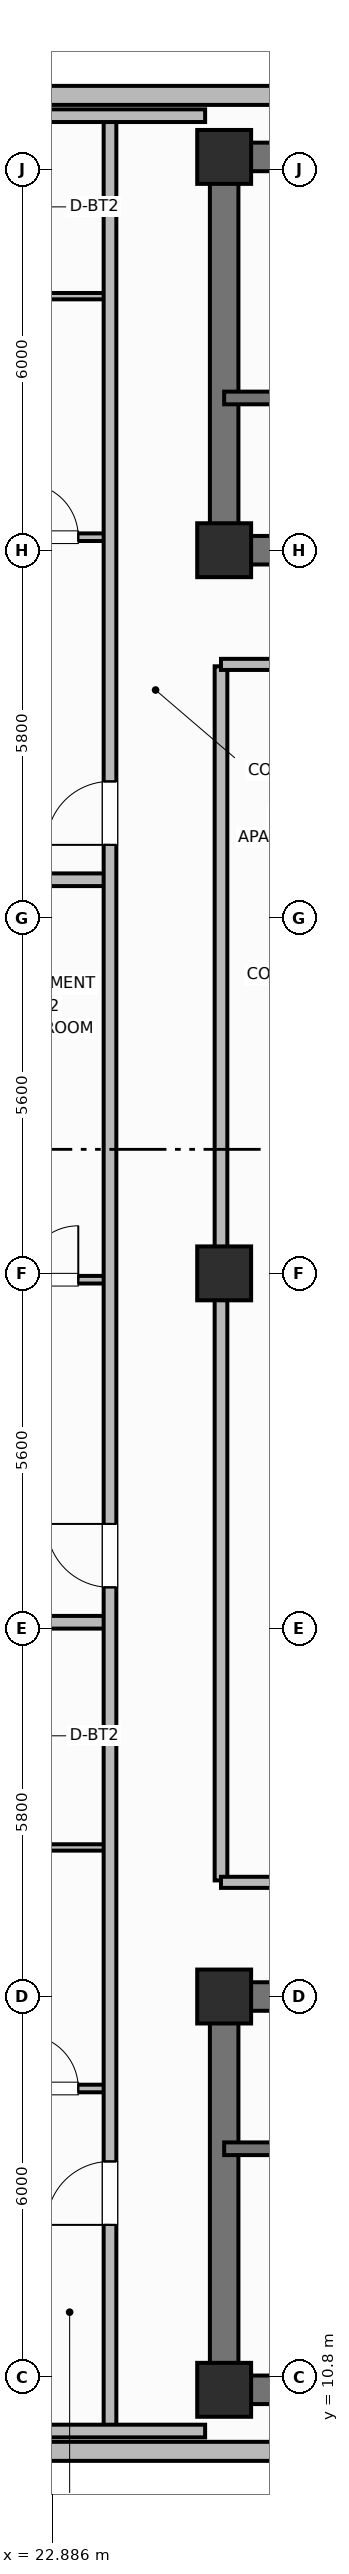
"""IFC4 building model, lengths in metres.
Left out: names, types, materials, properties, quantities, classifications, styles, units other than length and angle.
Written with IfcOpenShell. Run it as: python <this file> out.ifc"""

import sys

from ifc_helpers import new_model, si_unit, direction, frame, frame_2d, origin, origin_2d, place, context, subcontext, project, spatial, rectangle, extrude, element, fill, save


model = new_model("IFC4")
c1 = context("Model", 3, precision=1e-05, world=origin(), true_north=direction((0.0, 1.0)))
c2 = subcontext(c1, "Body", "Model", "MODEL_VIEW")
j1 = project(units=[si_unit("LENGTHUNIT", "METRE"), si_unit("PLANEANGLEUNIT", "RADIAN")], contexts=[c1])
p1 = place(None, origin())
s1 = spatial("IfcSite", under=j1, at=p1, CompositionType="ELEMENT")
p2 = place(p1, origin())
s2 = spatial("IfcBuilding", under=s1, at=p2, CompositionType="ELEMENT")
p3 = place(p2, frame((0.0, 0.0, 236.9)))
s3 = spatial("IfcBuildingStorey", under=s2, at=p3, CompositionType="ELEMENT", Elevation=236.9)
p4 = place(p3, frame((52.8, 10.6, 0.0), z_axis=(0.0, 0.0, 1.0), x_axis=(-1.0, 0.0, 0.0)))
e1 = element("IfcWall", 1, at=p4, inside=s3, PredefinedType="SHEAR", context=c2, shape_type="SweptSolid", body=[
    extrude(rectangle(XDim=27.2, YDim=0.45, at=frame_2d((13.6, 0.0))), origin(), (0.0, 0.0, 1.0), 3.7),
])
p5 = place(p3, frame((25.6, 10.825, 0.0), z_axis=(0.0, 0.0, 1.0), x_axis=(0.0, 1.0, 0.0)))
e2 = element("IfcWall", 2, at=p5, inside=s3, PredefinedType="SHEAR", context=c2, shape_type="SweptSolid", body=[
    extrude(rectangle(XDim=5.75, YDim=0.45, at=frame_2d((2.875, 0.0))), origin(), (0.0, 0.0, 1.0), 3.7),
])
p6 = place(p3, frame((25.6, 16.8, 0.0), z_axis=(0.0, 0.0, 1.0), x_axis=(1.0, 0.0, 0.0)))
e3 = element("IfcWall", 3, at=p6, inside=s3, PredefinedType="SHEAR", context=c2, shape_type="SweptSolid", body=[
    extrude(rectangle(XDim=27.2, YDim=0.45, at=frame_2d((13.6, 0.0))), origin(), (0.0, 0.0, 1.0), 3.7),
])
p7 = place(p6, frame((1.7, 0.0, 0.0)))
e4 = element("IfcOpeningElement", 4, at=p7, cuts=e3, PredefinedType="OPENING", context=c2, shape_type="SweptSolid", body=[
    extrude(rectangle(XDim=1.1, YDim=2.15, at=frame_2d((0.55, 1.075))), frame((0.0, 0.235, 0.0), z_axis=(0.0, -1.0, 0.0), x_axis=(1.0, 0.0, 0.0)), (0.0, 0.0, 1.0), 0.47),
])
p8 = place(p6, frame((4.45, 0.0, 0.0)))
e5 = element("IfcOpeningElement", 5, at=p8, cuts=e3, PredefinedType="OPENING", context=c2, shape_type="SweptSolid", body=[
    extrude(rectangle(XDim=0.85, YDim=2.1, at=frame_2d((0.425, 1.05))), frame((0.0, 0.235, 0.0), z_axis=(0.0, -1.0, 0.0), x_axis=(1.0, 0.0, 0.0)), (0.0, 0.0, 1.0), 0.47),
])
p9 = place(p6, frame((6.5, 0.0, 0.0)))
e6 = element("IfcOpeningElement", 6, at=p9, cuts=e3, PredefinedType="OPENING", context=c2, shape_type="SweptSolid", body=[
    extrude(rectangle(XDim=0.85, YDim=2.1, at=frame_2d((0.425, 1.05))), frame((0.0, 0.235, 0.0), z_axis=(0.0, -1.0, 0.0), x_axis=(1.0, 0.0, 0.0)), (0.0, 0.0, 1.0), 0.47),
])
p10 = place(p6, frame((13.0, 0.0, 0.0)))
e7 = element("IfcOpeningElement", 7, at=p10, cuts=e3, PredefinedType="OPENING", context=c2, shape_type="SweptSolid", body=[
    extrude(rectangle(XDim=1.2, YDim=2.15, at=frame_2d((0.6, 1.075))), frame((0.0, 0.235, 0.0), z_axis=(0.0, -1.0, 0.0), x_axis=(1.0, 0.0, 0.0)), (0.0, 0.0, 1.0), 0.47),
])
p11 = place(p6, frame((19.8, 0.0, 0.0)))
e8 = element("IfcOpeningElement", 8, at=p11, cuts=e3, PredefinedType="OPENING", context=c2, shape_type="SweptSolid", body=[
    extrude(rectangle(XDim=0.85, YDim=2.1, at=frame_2d((0.425, 1.05))), frame((0.0, 0.235, 0.0), z_axis=(0.0, -1.0, 0.0), x_axis=(1.0, 0.0, 0.0)), (0.0, 0.0, 1.0), 0.47),
])
p12 = place(p6, frame((24.2, 0.0, 0.0)))
e9 = element("IfcOpeningElement", 9, at=p12, cuts=e3, PredefinedType="OPENING", context=c2, shape_type="SweptSolid", body=[
    extrude(rectangle(XDim=0.85, YDim=2.1, at=frame_2d((0.425, 1.05))), frame((0.0, 0.235, 0.0), z_axis=(0.0, -1.0, 0.0), x_axis=(1.0, 0.0, 0.0)), (0.0, 0.0, 1.0), 0.47),
])
p13 = place(p3, frame((25.6, 45.8, 0.0), z_axis=(0.0, 0.0, 1.0), x_axis=(1.0, 0.0, 0.0)))
e10 = element("IfcWall", 10, at=p13, inside=s3, PredefinedType="SHEAR", context=c2, shape_type="SweptSolid", body=[
    extrude(rectangle(XDim=27.2, YDim=0.45, at=frame_2d((13.6, 0.0))), origin(), (0.0, 0.0, 1.0), 3.7),
])
p14 = place(p3, frame((25.6, 39.825, 0.0), z_axis=(0.0, 0.0, 1.0), x_axis=(0.0, 1.0, 0.0)))
e11 = element("IfcWall", 11, at=p14, inside=s3, PredefinedType="SHEAR", context=c2, shape_type="SweptSolid", body=[
    extrude(rectangle(XDim=5.75, YDim=0.45, at=frame_2d((2.875, 0.0))), origin(), (0.0, 0.0, 1.0), 3.7),
])
p15 = place(p3, frame((52.8, 39.6, 0.0), z_axis=(0.0, 0.0, 1.0), x_axis=(-1.0, 0.0, 0.0)))
e12 = element("IfcWall", 12, at=p15, inside=s3, PredefinedType="SHEAR", context=c2, shape_type="SweptSolid", body=[
    extrude(rectangle(XDim=27.2, YDim=0.45, at=frame_2d((13.6, 0.0))), origin(), (0.0, 0.0, 1.0), 3.7),
])
p16 = place(p15, frame((24.3, 0.0, 0.0)))
e13 = element("IfcOpeningElement", 13, at=p16, cuts=e12, PredefinedType="OPENING", context=c2, shape_type="SweptSolid", body=[
    extrude(rectangle(XDim=1.1, YDim=2.15, at=frame_2d((0.55, 1.075))), frame((0.0, 0.235, 0.0), z_axis=(0.0, -1.0, 0.0), x_axis=(1.0, 0.0, 0.0)), (0.0, 0.0, 1.0), 0.47),
])
p17 = place(p15, frame((21.85, 0.0, 0.0)))
e14 = element("IfcOpeningElement", 14, at=p17, cuts=e12, PredefinedType="OPENING", context=c2, shape_type="SweptSolid", body=[
    extrude(rectangle(XDim=0.85, YDim=2.1, at=frame_2d((0.425, 1.05))), frame((0.0, 0.235, 0.0), z_axis=(0.0, -1.0, 0.0), x_axis=(1.0, 0.0, 0.0)), (0.0, 0.0, 1.0), 0.47),
])
p18 = place(p15, frame((19.85, 0.0, 0.0)))
e15 = element("IfcOpeningElement", 15, at=p18, cuts=e12, PredefinedType="OPENING", context=c2, shape_type="SweptSolid", body=[
    extrude(rectangle(XDim=0.85, YDim=2.1, at=frame_2d((0.425, 1.05))), frame((0.0, 0.235, 0.0), z_axis=(0.0, -1.0, 0.0), x_axis=(1.0, 0.0, 0.0)), (0.0, 0.0, 1.0), 0.47),
])
p19 = place(p15, frame((15.1, 0.0, 0.0)))
e16 = element("IfcOpeningElement", 16, at=p19, cuts=e12, PredefinedType="OPENING", context=c2, shape_type="SweptSolid", body=[
    extrude(rectangle(XDim=1.2, YDim=2.15, at=frame_2d((0.6, 1.075))), frame((0.0, 0.235, 0.0), z_axis=(0.0, -1.0, 0.0), x_axis=(1.0, 0.0, 0.0)), (0.0, 0.0, 1.0), 0.47),
])
p20 = place(p15, frame((12.6, 0.0, 0.0)))
e17 = element("IfcOpeningElement", 17, at=p20, cuts=e12, PredefinedType="OPENING", context=c2, shape_type="SweptSolid", body=[
    extrude(rectangle(XDim=0.85, YDim=2.1, at=frame_2d((0.425, 1.05))), frame((0.0, 0.235, 0.0), z_axis=(0.0, -1.0, 0.0), x_axis=(1.0, 0.0, 0.0)), (0.0, 0.0, 1.0), 0.47),
])
p21 = place(p15, frame((10.85, 0.0, 0.0)))
e18 = element("IfcOpeningElement", 18, at=p21, cuts=e12, PredefinedType="OPENING", context=c2, shape_type="SweptSolid", body=[
    extrude(rectangle(XDim=0.85, YDim=2.1, at=frame_2d((0.425, 1.05))), frame((0.0, 0.235, 0.0), z_axis=(0.0, -1.0, 0.0), x_axis=(1.0, 0.0, 0.0)), (0.0, 0.0, 1.0), 0.47),
])
p22 = place(p15, frame((7.35, 0.0, 0.0)))
e19 = element("IfcOpeningElement", 19, at=p22, cuts=e12, PredefinedType="OPENING", context=c2, shape_type="SweptSolid", body=[
    extrude(rectangle(XDim=0.85, YDim=2.1, at=frame_2d((0.425, 1.05))), frame((0.0, 0.235, 0.0), z_axis=(0.0, -1.0, 0.0), x_axis=(1.0, 0.0, 0.0)), (0.0, 0.0, 1.0), 0.47),
])
p23 = place(p15, frame((4.2, 0.0, 0.0)))
e20 = element("IfcOpeningElement", 20, at=p23, cuts=e12, PredefinedType="OPENING", context=c2, shape_type="SweptSolid", body=[
    extrude(rectangle(XDim=1.3, YDim=2.2, at=frame_2d((0.65, 1.1))), frame((0.0, 0.235, 0.0), z_axis=(0.0, -1.0, 0.0), x_axis=(1.0, 0.0, 0.0)), (0.0, 0.0, 1.0), 0.47),
])
for number, where, z_axis, x_axis in (
    (21, (25.6, 10.6, 0.0), (0.0, 0.0, 1.0), (1.0, 0.0, 0.0)),
    (22, (25.6, 16.8, 0.0), (0.0, 0.0, 1.0), (1.0, 0.0, 0.0)),
    (23, (25.6, 39.6, 0.0), (0.0, 0.0, 1.0), (1.0, 0.0, 0.0)),
    (24, (25.6, 45.8, 0.0), (0.0, 0.0, 1.0), (1.0, 0.0, 0.0)),
    (25, (25.6, 28.2, 0.0), (0.0, 0.0, 1.0), (1.0, 0.0, 0.0)),
):
    element("IfcColumn", number, at=place(p3, frame(where, z_axis=z_axis, x_axis=x_axis)), inside=s3, PredefinedType="COLUMN", context=c2, shape_type="SweptSolid", body=[
        extrude(rectangle(XDim=0.85, YDim=0.85, at=origin_2d()), origin(), (0.0, 0.0, 1.0), 3.7),
    ])
p24 = place(p3, frame((22.56, 9.63, 0.0), z_axis=(0.0, 0.0, 1.0), x_axis=(1.0, 0.0, 0.0)))
e26 = element("IfcWall", 26, at=p24, inside=s3, PredefinedType="SOLIDWALL", context=c2, shape_type="SweptSolid", body=[
    extrude(rectangle(XDim=4.45, YDim=0.3, at=frame_2d((2.225, 0.0))), origin(), (0.0, 0.0, 1.0), 2.73),
])
p25 = place(p3, frame((47.79, 46.77, 0.0), z_axis=(0.0, 0.0, 1.0), x_axis=(-1.0, 0.0, 0.0)))
e27 = element("IfcWall", 27, at=p25, inside=s3, PredefinedType="SOLIDWALL", context=c2, shape_type="SweptSolid", body=[
    extrude(rectangle(XDim=25.23, YDim=0.3, at=frame_2d((12.615, 0.0))), origin(), (0.0, 0.0, 1.0), 2.73),
])
p26 = place(p25, frame((1.659, 0.0, 0.76)))
e28 = element("IfcOpeningElement", 28, at=p26, cuts=e27, PredefinedType="OPENING", context=c2, shape_type="SweptSolid", body=[
    extrude(rectangle(XDim=1.4, YDim=1.85, at=frame_2d((0.7, 0.925))), frame((0.0, 0.16, 0.0), z_axis=(0.0, -1.0, 0.0), x_axis=(1.0, 0.0, 0.0)), (0.0, 0.0, 1.0), 0.32),
])
p27 = place(p25, frame((5.778, 0.0, 0.76)))
e29 = element("IfcOpeningElement", 29, at=p27, cuts=e27, PredefinedType="OPENING", context=c2, shape_type="SweptSolid", body=[
    extrude(rectangle(XDim=1.4, YDim=1.85, at=frame_2d((0.7, 0.925))), frame((0.0, 0.16, 0.0), z_axis=(0.0, -1.0, 0.0), x_axis=(1.0, 0.0, 0.0)), (0.0, 0.0, 1.0), 0.32),
])
p28 = place(p25, frame((8.496, 0.0, 0.76)))
e30 = element("IfcOpeningElement", 30, at=p28, cuts=e27, PredefinedType="OPENING", context=c2, shape_type="SweptSolid", body=[
    extrude(rectangle(XDim=1.4, YDim=1.85, at=frame_2d((0.7, 0.925))), frame((0.0, 0.16, 0.0), z_axis=(0.0, -1.0, 0.0), x_axis=(1.0, 0.0, 0.0)), (0.0, 0.0, 1.0), 0.32),
])
p29 = place(p25, frame((15.333, 0.0, 0.76)))
e31 = element("IfcOpeningElement", 31, at=p29, cuts=e27, PredefinedType="OPENING", context=c2, shape_type="SweptSolid", body=[
    extrude(rectangle(XDim=1.4, YDim=1.85, at=frame_2d((0.7, 0.925))), frame((0.0, 0.16, 0.0), z_axis=(0.0, -1.0, 0.0), x_axis=(1.0, 0.0, 0.0)), (0.0, 0.0, 1.0), 0.32),
])
p30 = place(p25, frame((18.752, 0.0, 0.76)))
e32 = element("IfcOpeningElement", 32, at=p30, cuts=e27, PredefinedType="OPENING", context=c2, shape_type="SweptSolid", body=[
    extrude(rectangle(XDim=1.4, YDim=1.85, at=frame_2d((0.7, 0.925))), frame((0.0, 0.16, 0.0), z_axis=(0.0, -1.0, 0.0), x_axis=(1.0, 0.0, 0.0)), (0.0, 0.0, 1.0), 0.32),
])
p31 = place(p3, frame((25.6, 14.4, 0.0), z_axis=(0.0, 0.0, 1.0), x_axis=(1.0, 0.0, 0.0)))
e33 = element("IfcWall", 33, at=p31, inside=s3, PredefinedType="SHEAR", context=c2, shape_type="SweptSolid", body=[
    extrude(rectangle(XDim=9.55, YDim=0.2, at=frame_2d((4.775, 0.0))), origin(), (0.0, 0.0, 1.0), 3.7),
])
p32 = place(p31, frame((1.05, 0.0, 0.0)))
e34 = element("IfcOpeningElement", 34, at=p32, cuts=e33, PredefinedType="OPENING", context=c2, shape_type="SweptSolid", body=[
    extrude(rectangle(XDim=1.1, YDim=2.15, at=frame_2d((0.55, 1.075))), frame((0.0, 0.11, 0.0), z_axis=(0.0, -1.0, 0.0), x_axis=(1.0, 0.0, 0.0)), (0.0, 0.0, 1.0), 0.22),
])
p33 = place(p3, frame((35.15, 42.0, 0.0), z_axis=(0.0, 0.0, 1.0), x_axis=(-1.0, 0.0, 0.0)))
e35 = element("IfcWall", 35, at=p33, inside=s3, PredefinedType="SHEAR", context=c2, shape_type="SweptSolid", body=[
    extrude(rectangle(XDim=9.55, YDim=0.2, at=frame_2d((4.775, 0.0))), origin(), (0.0, 0.0, 1.0), 3.7),
])
p34 = place(p33, frame((7.25, 0.0, 0.0)))
e36 = element("IfcOpeningElement", 36, at=p34, cuts=e35, PredefinedType="OPENING", context=c2, shape_type="SweptSolid", body=[
    extrude(rectangle(XDim=1.1, YDim=2.15, at=frame_2d((0.55, 1.075))), frame((0.0, 0.11, 0.0), z_axis=(0.0, -1.0, 0.0), x_axis=(1.0, 0.0, 0.0)), (0.0, 0.0, 1.0), 0.22),
])
p35 = place(p3, frame((25.55, 18.63, 0.0), z_axis=(0.0, 0.0, 1.0), x_axis=(0.0, 1.0, 0.0)))
e37 = element("IfcWall", 37, at=p35, inside=s3, PredefinedType="PARTITIONING", context=c2, shape_type="SweptSolid", body=[
    extrude(rectangle(XDim=19.14, YDim=0.2, at=frame_2d((9.57, 0.0))), origin(), (0.0, 0.0, 1.0), 2.56),
])
for number, where, z_axis, x_axis in (
    (38, (25.55, 18.6, 0.0), (0.0, 0.0, 1.0), (1.0, 0.0, 0.0)),
    (39, (25.55, 37.8, 0.0), (0.0, 0.0, 1.0), (1.0, 0.0, 0.0)),
):
    element("IfcWall", number, at=place(p3, frame(where, z_axis=z_axis, x_axis=x_axis)), inside=s3, PredefinedType="PARTITIONING", context=c2, shape_type="SweptSolid", body=[
        extrude(rectangle(XDim=3.5, YDim=0.175, at=frame_2d((1.75, 0.0))), origin(), (0.0, 0.0, 1.0), 2.56),
    ])
p36 = place(p3, frame((21.85, 15.35, 0.0), z_axis=(0.0, 0.0, 1.0), x_axis=(1.0, 0.0, 0.0)))
e40 = element("IfcWall", 40, at=p36, inside=s3, PredefinedType="PARTITIONING", context=c2, shape_type="SweptSolid", body=[
    extrude(rectangle(XDim=1.95, YDim=0.12, at=frame_2d((0.975, 0.0))), origin(), (0.0, 0.0, 1.0), 2.56),
])
p37 = place(p36, frame((0.6, 0.0, 0.0)))
e41 = element("IfcOpeningElement", 41, at=p37, cuts=e40, PredefinedType="OPENING", context=c2, shape_type="SweptSolid", body=[
    extrude(rectangle(XDim=0.85, YDim=2.1, at=frame_2d((0.425, 1.05))), frame((0.0, 0.07, 0.0), z_axis=(0.0, -1.0, 0.0), x_axis=(1.0, 0.0, 0.0)), (0.0, 0.0, 1.0), 0.14),
])
p38 = place(p3, frame((21.85, 19.15, 0.0), z_axis=(0.0, 0.0, 1.0), x_axis=(1.0, 0.0, 0.0)))
e42 = element("IfcWall", 42, at=p38, inside=s3, PredefinedType="PARTITIONING", context=c2, shape_type="SweptSolid", body=[
    extrude(rectangle(XDim=1.95, YDim=0.1, at=frame_2d((0.975, 0.0))), origin(), (0.0, 0.0, 1.0), 2.56),
])
p39 = place(p3, frame((19.53, 22.7, 0.0), z_axis=(0.0, 0.0, 1.0), x_axis=(1.0, 0.0, 0.0)))
e43 = element("IfcWall", 43, at=p39, inside=s3, PredefinedType="PARTITIONING", context=c2, shape_type="SweptSolid", body=[
    extrude(rectangle(XDim=4.27, YDim=0.2, at=frame_2d((2.135, 0.0))), origin(), (0.0, 0.0, 1.0), 2.56),
])
p40 = place(p3, frame((21.85, 28.1, 0.0), z_axis=(0.0, 0.0, 1.0), x_axis=(1.0, 0.0, 0.0)))
e44 = element("IfcWall", 44, at=p40, inside=s3, PredefinedType="PARTITIONING", context=c2, shape_type="SweptSolid", body=[
    extrude(rectangle(XDim=1.95, YDim=0.12, at=frame_2d((0.975, 0.0))), origin(), (0.0, 0.0, 1.0), 2.56),
])
p41 = place(p40, frame((0.6, 0.0, 0.0)))
e45 = element("IfcOpeningElement", 45, at=p41, cuts=e44, PredefinedType="OPENING", context=c2, shape_type="SweptSolid", body=[
    extrude(rectangle(XDim=0.85, YDim=2.1, at=frame_2d((0.425, 1.05))), frame((0.0, 0.07, 0.0), z_axis=(0.0, -1.0, 0.0), x_axis=(1.0, 0.0, 0.0)), (0.0, 0.0, 1.0), 0.14),
])
p42 = place(p3, frame((19.53, 34.405, 0.0), z_axis=(0.0, 0.0, 1.0), x_axis=(1.0, 0.0, 0.0)))
e46 = element("IfcWall", 46, at=p42, inside=s3, PredefinedType="PARTITIONING", context=c2, shape_type="SweptSolid", body=[
    extrude(rectangle(XDim=4.27, YDim=0.2, at=frame_2d((2.135, 0.0))), origin(), (0.0, 0.0, 1.0), 2.56),
])
p43 = place(p3, frame((21.85, 39.805, 0.0), z_axis=(0.0, 0.0, 1.0), x_axis=(1.0, 0.0, 0.0)))
e47 = element("IfcWall", 47, at=p43, inside=s3, PredefinedType="PARTITIONING", context=c2, shape_type="SweptSolid", body=[
    extrude(rectangle(XDim=1.95, YDim=0.12, at=frame_2d((0.975, 0.0))), origin(), (0.0, 0.0, 1.0), 2.56),
])
p44 = place(p43, frame((0.6, 0.0, 0.0)))
e48 = element("IfcOpeningElement", 48, at=p44, cuts=e47, PredefinedType="OPENING", context=c2, shape_type="SweptSolid", body=[
    extrude(rectangle(XDim=0.85, YDim=2.1, at=frame_2d((0.425, 1.05))), frame((0.0, 0.07, 0.0), z_axis=(0.0, -1.0, 0.0), x_axis=(1.0, 0.0, 0.0)), (0.0, 0.0, 1.0), 0.14),
])
p45 = place(p3, frame((21.85, 43.605, 0.0), z_axis=(0.0, 0.0, 1.0), x_axis=(1.0, 0.0, 0.0)))
e49 = element("IfcWall", 49, at=p45, inside=s3, PredefinedType="PARTITIONING", context=c2, shape_type="SweptSolid", body=[
    extrude(rectangle(XDim=1.95, YDim=0.1, at=frame_2d((0.975, 0.0))), origin(), (0.0, 0.0, 1.0), 2.56),
])
p46 = place(p3, frame((23.8, 9.95, 0.0), z_axis=(0.0, 0.0, 1.0), x_axis=(0.0, 1.0, 0.0)))
e50 = element("IfcWall", 50, at=p46, inside=s3, PredefinedType="PARTITIONING", context=c2, shape_type="SweptSolid", body=[
    extrude(rectangle(XDim=36.5, YDim=0.2, at=frame_2d((18.25, 0.0))), origin(), (0.0, 0.0, 1.0), 2.56),
])
p47 = place(p46, frame((3.25, 0.0, 0.0)))
e51 = element("IfcOpeningElement", 51, at=p47, cuts=e50, PredefinedType="OPENING", context=c2, shape_type="SweptSolid", body=[
    extrude(rectangle(XDim=1.0, YDim=2.15, at=frame_2d((0.5, 1.075))), frame((0.0, 0.11, 0.0), z_axis=(0.0, -1.0, 0.0), x_axis=(1.0, 0.0, 0.0)), (0.0, 0.0, 1.0), 0.22),
])
p48 = place(p46, frame((13.3, 0.0, 0.0)))
e52 = element("IfcOpeningElement", 52, at=p48, cuts=e50, PredefinedType="OPENING", context=c2, shape_type="SweptSolid", body=[
    extrude(rectangle(XDim=1.0, YDim=2.15, at=frame_2d((0.5, 1.075))), frame((0.0, 0.11, 0.0), z_axis=(0.0, -1.0, 0.0), x_axis=(1.0, 0.0, 0.0)), (0.0, 0.0, 1.0), 0.22),
])
p49 = place(p46, frame((25.005, 0.0, 0.0)))
e53 = element("IfcOpeningElement", 53, at=p49, cuts=e50, PredefinedType="OPENING", context=c2, shape_type="SweptSolid", body=[
    extrude(rectangle(XDim=1.0, YDim=2.15, at=frame_2d((0.5, 1.075))), frame((0.0, 0.11, 0.0), z_axis=(0.0, -1.0, 0.0), x_axis=(1.0, 0.0, 0.0)), (0.0, 0.0, 1.0), 0.22),
])
for number, where, z_axis, x_axis in (
    (54, (21.546, 9.95, 0.0), (0.0, 0.0, 1.0), (1.0, 0.0, 0.0)),
    (55, (21.546, 46.45, 0.0), (0.0, 0.0, 1.0), (1.0, 0.0, 0.0)),
):
    element("IfcWall", number, at=place(p3, frame(where, z_axis=z_axis, x_axis=x_axis)), inside=s3, PredefinedType="PARTITIONING", context=c2, shape_type="SweptSolid", body=[
        extrude(rectangle(XDim=3.754, YDim=0.2, at=frame_2d((1.877, 0.0))), origin(), (0.0, 0.0, 1.0), 2.56),
    ])
p50 = place(p37, origin())
e56 = element("IfcDoor", 56, at=p50, inside=s3, OperationType="SINGLE_SWING_LEFT", PredefinedType="DOOR", context=c2, shape_type="SweptSolid", body=[
    extrude(rectangle(XDim=0.85, YDim=2.1, at=frame_2d((0.425, 1.05))), frame((0.0, 0.025, 0.0), z_axis=(0.0, -1.0, 0.0), x_axis=(1.0, 0.0, 0.0)), (0.0, 0.0, 1.0), 0.05),
])
fill(e41, e56)
p51 = place(p41, origin())
e57 = element("IfcDoor", 57, at=p51, inside=s3, OperationType="SINGLE_SWING_RIGHT", PredefinedType="DOOR", context=c2, shape_type="SweptSolid", body=[
    extrude(rectangle(XDim=0.85, YDim=2.1, at=frame_2d((0.425, 1.05))), frame((0.0, 0.025, 0.0), z_axis=(0.0, -1.0, 0.0), x_axis=(1.0, 0.0, 0.0)), (0.0, 0.0, 1.0), 0.05),
])
fill(e45, e57)
p52 = place(p44, origin())
e58 = element("IfcDoor", 58, at=p52, inside=s3, OperationType="SINGLE_SWING_LEFT", PredefinedType="DOOR", context=c2, shape_type="SweptSolid", body=[
    extrude(rectangle(XDim=0.85, YDim=2.1, at=frame_2d((0.425, 1.05))), frame((0.0, 0.025, 0.0), z_axis=(0.0, -1.0, 0.0), x_axis=(1.0, 0.0, 0.0)), (0.0, 0.0, 1.0), 0.05),
])
fill(e48, e58)
p53 = place(p47, origin())
e59 = element("IfcDoor", 59, at=p53, inside=s3, OperationType="SINGLE_SWING_LEFT", PredefinedType="DOOR", context=c2, shape_type="SweptSolid", body=[
    extrude(rectangle(XDim=1.0, YDim=2.15, at=frame_2d((0.5, 1.075))), frame((0.0, 0.025, 0.0), z_axis=(0.0, -1.0, 0.0), x_axis=(1.0, 0.0, 0.0)), (0.0, 0.0, 1.0), 0.05),
])
fill(e51, e59)
p54 = place(p48, origin())
e60 = element("IfcDoor", 60, at=p54, inside=s3, OperationType="SINGLE_SWING_RIGHT", PredefinedType="DOOR", context=c2, shape_type="SweptSolid", body=[
    extrude(rectangle(XDim=1.0, YDim=2.15, at=frame_2d((0.5, 1.075))), frame((0.0, 0.025, 0.0), z_axis=(0.0, -1.0, 0.0), x_axis=(1.0, 0.0, 0.0)), (0.0, 0.0, 1.0), 0.05),
])
fill(e52, e60)
p55 = place(p49, origin())
e61 = element("IfcDoor", 61, at=p55, inside=s3, OperationType="SINGLE_SWING_LEFT", PredefinedType="DOOR", context=c2, shape_type="SweptSolid", body=[
    extrude(rectangle(XDim=1.0, YDim=2.15, at=frame_2d((0.5, 1.075))), frame((0.0, 0.025, 0.0), z_axis=(0.0, -1.0, 0.0), x_axis=(1.0, 0.0, 0.0)), (0.0, 0.0, 1.0), 0.05),
])
fill(e53, e61)
save(model, sys.argv[1])
